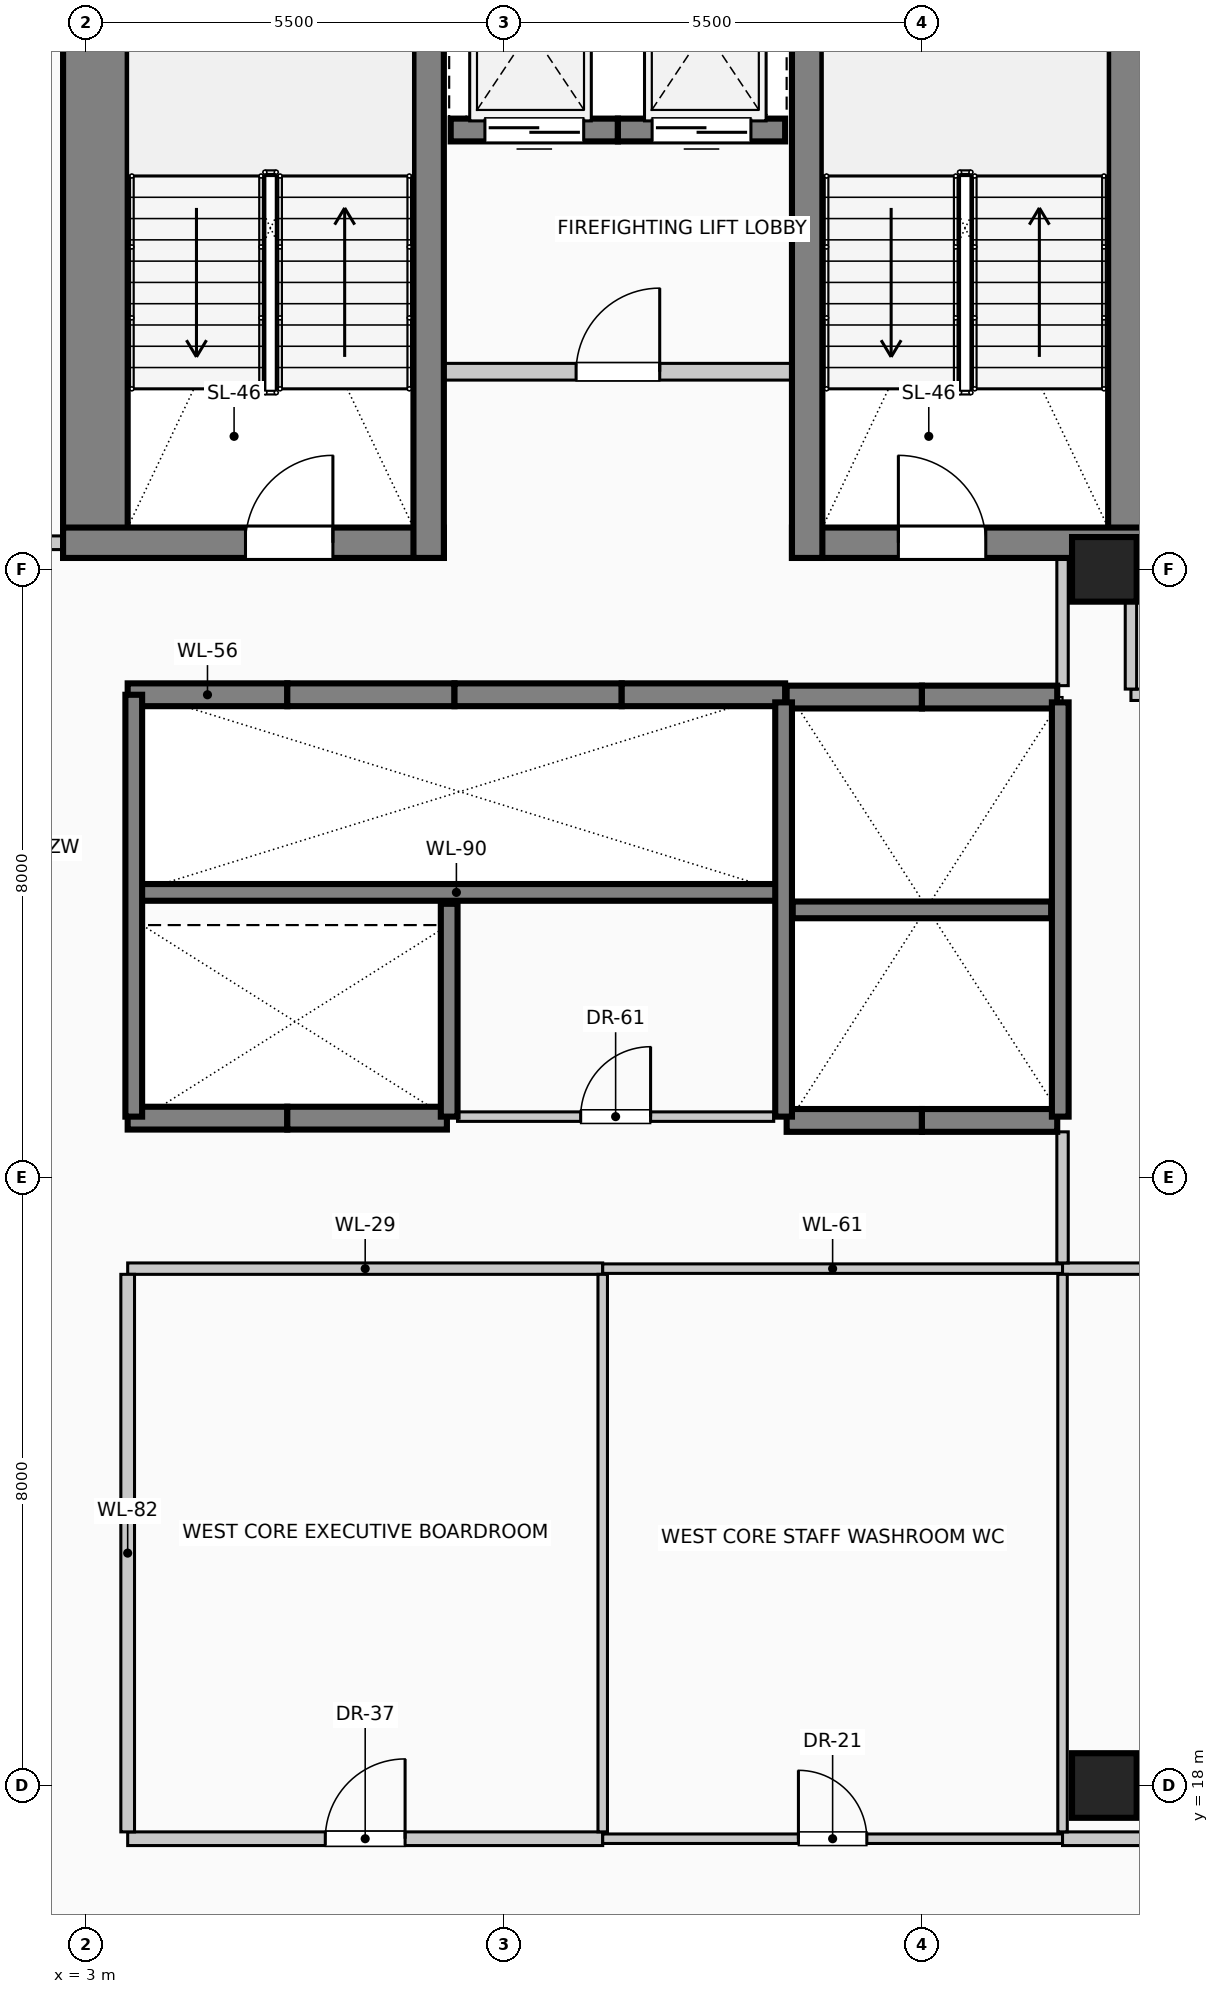
"""IFC4 building model, lengths in metres.
Left out: names, types, materials, properties, quantities, classifications, styles, units other than length and angle.
Written with IfcOpenShell. Run it as: python <this file> out.ifc"""

import sys

from ifc_helpers import new_model, si_unit, direction, frame, frame_2d, origin, origin_2d, place, context, subcontext, project, spatial, rectangle, circle, extrude, element, fill, save


model = new_model("IFC4")
c1 = context("Model", 3, precision=1e-05, world=origin(), true_north=direction((0.0, 1.0)))
c2 = subcontext(c1, "Body", "Model", "MODEL_VIEW")
j1 = project(units=[si_unit("LENGTHUNIT", "METRE"), si_unit("PLANEANGLEUNIT", "RADIAN")], contexts=[c1])
p1 = place(None, origin())
s1 = spatial("IfcSite", under=j1, at=p1, CompositionType="ELEMENT")
p2 = place(p1, origin())
s2 = spatial("IfcBuilding", under=s1, at=p2, CompositionType="ELEMENT")
p3 = place(p2, frame((0.0, 0.0, 170.6)))
s3 = spatial("IfcBuildingStorey", under=s2, at=p3, CompositionType="ELEMENT", Elevation=170.6)
for number, where, z_axis, x_axis in (
    (1, (3.125, 34.15, 0.0), (0.0, 0.0, 1.0), (0.0, 1.0, 0.0)),
    (2, (16.875, 34.15, 0.0), (0.0, 0.0, 1.0), (0.0, 1.0, 0.0)),
):
    element("IfcWall", number, at=place(p3, frame(where, z_axis=z_axis, x_axis=x_axis)), inside=s3, PredefinedType="SHEAR", context=c2, shape_type="SweptSolid", body=[
        extrude(rectangle(XDim=9.13, YDim=0.85, at=frame_2d((4.565, 0.0))), origin(), (0.0, 0.0, 1.0), 4.0),
    ])
p4 = place(p3, frame((2.7, 34.35, 0.0), z_axis=(0.0, 0.0, 1.0), x_axis=(1.0, 0.0, 0.0)))
e3 = element("IfcWall", 3, at=p4, inside=s3, PredefinedType="SHEAR", context=c2, shape_type="SweptSolid", body=[
    extrude(rectangle(XDim=5.01, YDim=0.4, at=frame_2d((2.505, 0.0))), origin(), (0.0, 0.0, 1.0), 4.0),
])
p5 = place(p4, frame((2.4, 0.0, 0.0)))
e4 = element("IfcOpeningElement", 4, at=p5, cuts=e3, PredefinedType="OPENING", context=c2, shape_type="SweptSolid", body=[
    extrude(rectangle(XDim=1.15, YDim=2.2, at=frame_2d((0.575, 1.1))), frame((0.0, 0.21, 0.0), z_axis=(0.0, -1.0, 0.0), x_axis=(1.0, 0.0, 0.0)), (0.0, 0.0, 1.0), 0.42),
])
p6 = place(p3, frame((12.29, 34.35, 0.0), z_axis=(0.0, 0.0, 1.0), x_axis=(1.0, 0.0, 0.0)))
e5 = element("IfcWall", 5, at=p6, inside=s3, PredefinedType="SHEAR", context=c2, shape_type="SweptSolid", body=[
    extrude(rectangle(XDim=5.01, YDim=0.4, at=frame_2d((2.505, 0.0))), origin(), (0.0, 0.0, 1.0), 4.0),
])
p7 = place(p6, frame((1.4, 0.0, 0.0)))
e6 = element("IfcOpeningElement", 6, at=p7, cuts=e5, PredefinedType="OPENING", context=c2, shape_type="SweptSolid", body=[
    extrude(rectangle(XDim=1.15, YDim=2.2, at=frame_2d((0.575, 1.1))), frame((0.0, 0.21, 0.0), z_axis=(0.0, -1.0, 0.0), x_axis=(1.0, 0.0, 0.0)), (0.0, 0.0, 1.0), 0.42),
])
for number, where, z_axis, x_axis in (
    (7, (7.51, 34.15, 0.0), (0.0, 0.0, 1.0), (0.0, 1.0, 0.0)),
    (8, (12.49, 34.15, 0.0), (0.0, 0.0, 1.0), (0.0, 1.0, 0.0)),
):
    element("IfcWall", number, at=place(p3, frame(where, z_axis=z_axis, x_axis=x_axis)), inside=s3, PredefinedType="SHEAR", context=c2, shape_type="SweptSolid", body=[
        extrude(rectangle(XDim=9.13, YDim=0.4, at=frame_2d((4.565, 0.0))), origin(), (0.0, 0.0, 1.0), 4.0),
    ])
for number, where, z_axis, x_axis in (
    (9, (16.4, 18.0, 0.0), (0.0, 0.0, 1.0), (1.0, 0.0, 0.0)),
    (10, (16.4, 34.0, 0.0), (0.0, 0.0, 1.0), (1.0, 0.0, 0.0)),
):
    element("IfcColumn", number, at=place(p3, frame(where, z_axis=z_axis, x_axis=x_axis)), inside=s3, PredefinedType="COLUMN", context=c2, shape_type="SweptSolid", body=[
        extrude(circle(Radius=0.425, at=origin_2d()), origin(), (0.0, 0.0, 1.0), 4.0),
    ])
for number, where, z_axis, x_axis in (
    (11, (14.0, 26.75, 0.0), (0.0, 0.0, 1.0), (-1.0, 0.0, 0.0)),
    (12, (15.78, 26.75, 0.0), (0.0, 0.0, 1.0), (-1.0, 0.0, 0.0)),
    (13, (12.22, 32.32, 0.0), (0.0, 0.0, 1.0), (1.0, 0.0, 0.0)),
    (14, (14.0, 32.32, 0.0), (0.0, 0.0, 1.0), (1.0, 0.0, 0.0)),
):
    element("IfcWall", number, at=place(p3, frame(where, z_axis=z_axis, x_axis=x_axis)), inside=s3, PredefinedType="SOLIDWALL", context=c2, shape_type="SweptSolid", body=[
        extrude(rectangle(XDim=1.78, YDim=0.3, at=frame_2d((0.89, 0.0))), origin(), (0.0, 0.0, 1.0), 4.0),
    ])
p8 = place(p3, frame((3.55, 32.35, 0.0), z_axis=(0.0, 0.0, 1.0), x_axis=(1.0, 0.0, 0.0)))
e15 = element("IfcWall", 15, at=p8, inside=s3, PredefinedType="SOLIDWALL", context=c2, shape_type="SweptSolid", body=[
    extrude(rectangle(XDim=2.1, YDim=0.3, at=frame_2d((1.05, 0.0))), origin(), (0.0, 0.0, 1.0), 4.0),
])
p9 = place(p3, frame((5.65, 32.35, 0.0), z_axis=(0.0, 0.0, 1.0), x_axis=(1.0, 0.0, 0.0)))
e16 = element("IfcWall", 16, at=p9, inside=s3, PredefinedType="SOLIDWALL", context=c2, shape_type="SweptSolid", body=[
    extrude(rectangle(XDim=2.2, YDim=0.3, at=frame_2d((1.1, 0.0))), origin(), (0.0, 0.0, 1.0), 4.0),
])
p10 = place(p3, frame((7.85, 32.35, 0.0), z_axis=(0.0, 0.0, 1.0), x_axis=(1.0, 0.0, 0.0)))
e17 = element("IfcWall", 17, at=p10, inside=s3, PredefinedType="SOLIDWALL", context=c2, shape_type="SweptSolid", body=[
    extrude(rectangle(XDim=2.2, YDim=0.3, at=frame_2d((1.1, 0.0))), origin(), (0.0, 0.0, 1.0), 4.0),
])
p11 = place(p3, frame((10.05, 32.35, 0.0), z_axis=(0.0, 0.0, 1.0), x_axis=(1.0, 0.0, 0.0)))
e18 = element("IfcWall", 18, at=p11, inside=s3, PredefinedType="SOLIDWALL", context=c2, shape_type="SweptSolid", body=[
    extrude(rectangle(XDim=2.15, YDim=0.3, at=frame_2d((1.075, 0.0))), origin(), (0.0, 0.0, 1.0), 4.0),
])
p12 = place(p3, frame((5.65, 26.78, 0.0), z_axis=(0.0, 0.0, 1.0), x_axis=(-1.0, 0.0, 0.0)))
e19 = element("IfcWall", 19, at=p12, inside=s3, PredefinedType="SOLIDWALL", context=c2, shape_type="SweptSolid", body=[
    extrude(rectangle(XDim=2.1, YDim=0.3, at=frame_2d((1.05, 0.0))), origin(), (0.0, 0.0, 1.0), 4.0),
])
p13 = place(p3, frame((7.75, 26.78, 0.0), z_axis=(0.0, 0.0, 1.0), x_axis=(-1.0, 0.0, 0.0)))
e20 = element("IfcWall", 20, at=p13, inside=s3, PredefinedType="SOLIDWALL", context=c2, shape_type="SweptSolid", body=[
    extrude(rectangle(XDim=2.1, YDim=0.3, at=frame_2d((1.05, 0.0))), origin(), (0.0, 0.0, 1.0), 4.0),
])
p14 = place(p3, frame((10.0, 39.78, 0.0), z_axis=(0.0, 0.0, 1.0), x_axis=(-1.0, 0.0, 0.0)))
e21 = element("IfcWall", 21, at=p14, inside=s3, PredefinedType="SOLIDWALL", context=c2, shape_type="SweptSolid", body=[
    extrude(rectangle(XDim=2.2, YDim=0.3, at=frame_2d((1.1, 0.0))), origin(), (0.0, 0.0, 1.0), 4.0),
])
p15 = place(p14, frame((0.45, 0.0, 0.0)))
e22 = element("IfcOpeningElement", 22, at=p15, cuts=e21, PredefinedType="OPENING", context=c2, shape_type="SweptSolid", body=[
    extrude(rectangle(XDim=1.3, YDim=2.25, at=frame_2d((0.65, 1.125))), frame((0.0, 0.16, 0.0), z_axis=(0.0, -1.0, 0.0), x_axis=(1.0, 0.0, 0.0)), (0.0, 0.0, 1.0), 0.32),
])
p16 = place(p3, frame((12.2, 39.78, 0.0), z_axis=(0.0, 0.0, 1.0), x_axis=(-1.0, 0.0, 0.0)))
e23 = element("IfcWall", 23, at=p16, inside=s3, PredefinedType="SOLIDWALL", context=c2, shape_type="SweptSolid", body=[
    extrude(rectangle(XDim=2.2, YDim=0.3, at=frame_2d((1.1, 0.0))), origin(), (0.0, 0.0, 1.0), 4.0),
])
p17 = place(p16, frame((0.45, 0.0, 0.0)))
e24 = element("IfcOpeningElement", 24, at=p17, cuts=e23, PredefinedType="OPENING", context=c2, shape_type="SweptSolid", body=[
    extrude(rectangle(XDim=1.3, YDim=2.25, at=frame_2d((0.65, 1.125))), frame((0.0, 0.16, 0.0), z_axis=(0.0, -1.0, 0.0), x_axis=(1.0, 0.0, 0.0)), (0.0, 0.0, 1.0), 0.32),
])
p18 = place(p3, frame((3.55, 29.75, 0.0), z_axis=(0.0, 0.0, 1.0), x_axis=(1.0, 0.0, 0.0)))
e25 = element("IfcWall", 25, at=p18, inside=s3, PredefinedType="SOLIDWALL", context=c2, shape_type="SweptSolid", body=[
    extrude(rectangle(XDim=8.65, YDim=0.22, at=frame_2d((4.325, 0.0))), origin(), (0.0, 0.0, 1.0), 4.0),
])
p19 = place(p3, frame((3.63, 26.8, 0.0), z_axis=(0.0, 0.0, 1.0), x_axis=(0.0, 1.0, 0.0)))
e26 = element("IfcWall", 26, at=p19, inside=s3, PredefinedType="SOLIDWALL", context=c2, shape_type="SweptSolid", body=[
    extrude(rectangle(XDim=5.55, YDim=0.22, at=frame_2d((2.775, 0.0))), origin(), (0.0, 0.0, 1.0), 4.0),
])
p20 = place(p3, frame((7.78, 26.8, 0.0), z_axis=(0.0, 0.0, 1.0), x_axis=(0.0, 1.0, 0.0)))
e27 = element("IfcWall", 27, at=p20, inside=s3, PredefinedType="SOLIDWALL", context=c2, shape_type="SweptSolid", body=[
    extrude(rectangle(XDim=2.8, YDim=0.22, at=frame_2d((1.4, 0.0))), origin(), (0.0, 0.0, 1.0), 4.0),
])
for number, where, z_axis, x_axis in (
    (28, (12.18, 26.8, 0.0), (0.0, 0.0, 1.0), (0.0, 1.0, 0.0)),
    (29, (15.82, 26.8, 0.0), (0.0, 0.0, 1.0), (0.0, 1.0, 0.0)),
):
    element("IfcWall", number, at=place(p3, frame(where, z_axis=z_axis, x_axis=x_axis)), inside=s3, PredefinedType="SOLIDWALL", context=c2, shape_type="SweptSolid", body=[
        extrude(rectangle(XDim=5.45, YDim=0.22, at=frame_2d((2.725, 0.0))), origin(), (0.0, 0.0, 1.0), 4.0),
    ])
p21 = place(p3, frame((12.3, 29.52, 0.0), z_axis=(0.0, 0.0, 1.0), x_axis=(1.0, 0.0, 0.0)))
e30 = element("IfcWall", 30, at=p21, inside=s3, PredefinedType="SOLIDWALL", context=c2, shape_type="SweptSolid", body=[
    extrude(rectangle(XDim=3.4, YDim=0.22, at=frame_2d((1.7, 0.0))), origin(), (0.0, 0.0, 1.0), 4.0),
])
p22 = place(p3, frame((7.51, 36.6, 0.0), z_axis=(0.0, 0.0, 1.0), x_axis=(1.0, 0.0, 0.0)))
e31 = element("IfcWall", 31, at=p22, inside=s3, PredefinedType="PARTITIONING", context=c2, shape_type="SweptSolid", body=[
    extrude(rectangle(XDim=4.98, YDim=0.22, at=frame_2d((2.49, 0.0))), origin(), (0.0, 0.0, 1.0), 3.725),
])
p23 = place(p22, frame((1.94, 0.0, 0.0)))
e32 = element("IfcOpeningElement", 32, at=p23, cuts=e31, PredefinedType="OPENING", context=c2, shape_type="SweptSolid", body=[
    extrude(rectangle(XDim=1.1, YDim=2.2, at=frame_2d((0.55, 1.1))), frame((0.0, 0.12, 0.0), z_axis=(0.0, -1.0, 0.0), x_axis=(1.0, 0.0, 0.0)), (0.0, 0.0, 1.0), 0.24),
])
p24 = place(p3, frame((3.55, 17.3, 0.0), z_axis=(0.0, 0.0, 1.0), x_axis=(1.0, 0.0, 0.0)))
e33 = element("IfcWall", 33, at=p24, inside=s3, PredefinedType="PARTITIONING", context=c2, shape_type="SweptSolid", body=[
    extrude(rectangle(XDim=6.25, YDim=0.18, at=frame_2d((3.125, 0.0))), origin(), (0.0, 0.0, 1.0), 3.725),
])
p25 = place(p24, frame((2.6, 0.0, 0.0)))
e34 = element("IfcOpeningElement", 34, at=p25, cuts=e33, PredefinedType="OPENING", context=c2, shape_type="SweptSolid", body=[
    extrude(rectangle(XDim=1.05, YDim=2.15, at=frame_2d((0.525, 1.075))), frame((0.0, 0.1, 0.0), z_axis=(0.0, -1.0, 0.0), x_axis=(1.0, 0.0, 0.0)), (0.0, 0.0, 1.0), 0.2),
])
p26 = place(p3, frame((9.8, 17.3, 0.0), z_axis=(0.0, 0.0, 1.0), x_axis=(1.0, 0.0, 0.0)))
e35 = element("IfcWall", 35, at=p26, inside=s3, PredefinedType="PARTITIONING", context=c2, shape_type="SweptSolid", body=[
    extrude(rectangle(XDim=6.05, YDim=0.125, at=frame_2d((3.025, 0.0))), origin(), (0.0, 0.0, 1.0), 3.725),
])
p27 = place(p26, frame((2.575, 0.0, 0.0)))
e36 = element("IfcOpeningElement", 36, at=p27, cuts=e35, PredefinedType="OPENING", context=c2, shape_type="SweptSolid", body=[
    extrude(rectangle(XDim=0.9, YDim=2.1, at=frame_2d((0.45, 1.05))), frame((0.0, 0.073, 0.0), z_axis=(0.0, -1.0, 0.0), x_axis=(1.0, 0.0, 0.0)), (0.0, 0.0, 1.0), 0.145),
])
p28 = place(p3, frame((15.85, 17.3, 0.0), z_axis=(0.0, 0.0, 1.0), x_axis=(1.0, 0.0, 0.0)))
e37 = element("IfcWall", 37, at=p28, inside=s3, PredefinedType="PARTITIONING", context=c2, shape_type="SweptSolid", body=[
    extrude(rectangle(XDim=5.15, YDim=0.18, at=frame_2d((2.575, 0.0))), origin(), (0.0, 0.0, 1.0), 3.725),
])
p29 = place(p28, frame((2.415, 0.0, 0.0)))
e38 = element("IfcOpeningElement", 38, at=p29, cuts=e37, PredefinedType="OPENING", context=c2, shape_type="SweptSolid", body=[
    extrude(rectangle(XDim=1.4, YDim=2.2, at=frame_2d((0.7, 1.1))), frame((0.0, 0.1, 0.0), z_axis=(0.0, -1.0, 0.0), x_axis=(1.0, 0.0, 0.0)), (0.0, 0.0, 1.0), 0.2),
])
p30 = place(p3, frame((3.55, 24.8, 0.0), z_axis=(0.0, 0.0, 1.0), x_axis=(1.0, 0.0, 0.0)))
e39 = element("IfcWall", 39, at=p30, inside=s3, PredefinedType="PARTITIONING", context=c2, shape_type="SweptSolid", body=[
    extrude(rectangle(XDim=6.25, YDim=0.15, at=frame_2d((3.125, 0.0))), origin(), (0.0, 0.0, 1.0), 3.725),
])
p31 = place(p3, frame((9.8, 24.8, 0.0), z_axis=(0.0, 0.0, 1.0), x_axis=(1.0, 0.0, 0.0)))
e40 = element("IfcWall", 40, at=p31, inside=s3, PredefinedType="PARTITIONING", context=c2, shape_type="SweptSolid", body=[
    extrude(rectangle(XDim=6.05, YDim=0.125, at=frame_2d((3.025, 0.0))), origin(), (0.0, 0.0, 1.0), 3.725),
])
p32 = place(p3, frame((15.85, 24.8, 0.0), z_axis=(0.0, 0.0, 1.0), x_axis=(1.0, 0.0, 0.0)))
e41 = element("IfcWall", 41, at=p32, inside=s3, PredefinedType="PARTITIONING", context=c2, shape_type="SweptSolid", body=[
    extrude(rectangle(XDim=5.15, YDim=0.15, at=frame_2d((2.575, 0.0))), origin(), (0.0, 0.0, 1.0), 3.725),
])
p33 = place(p3, frame((7.89, 26.8, 0.0), z_axis=(0.0, 0.0, 1.0), x_axis=(1.0, 0.0, 0.0)))
e42 = element("IfcWall", 42, at=p33, inside=s3, PredefinedType="PARTITIONING", context=c2, shape_type="SweptSolid", body=[
    extrude(rectangle(XDim=4.16, YDim=0.125, at=frame_2d((2.08, 0.0))), origin(), (0.0, 0.0, 1.0), 3.725),
])
p34 = place(p33, frame((1.62, 0.0, 0.0)))
e43 = element("IfcOpeningElement", 43, at=p34, cuts=e42, PredefinedType="OPENING", context=c2, shape_type="SweptSolid", body=[
    extrude(rectangle(XDim=0.92, YDim=2.1, at=frame_2d((0.46, 1.05))), frame((0.0, 0.073, 0.0), z_axis=(0.0, -1.0, 0.0), x_axis=(1.0, 0.0, 0.0)), (0.0, 0.0, 1.0), 0.145),
])
p35 = place(p3, frame((16.75, 32.35, 0.0), z_axis=(0.0, 0.0, 1.0), x_axis=(1.0, 0.0, 0.0)))
e44 = element("IfcWall", 44, at=p35, inside=s3, PredefinedType="PARTITIONING", context=c2, shape_type="SweptSolid", body=[
    extrude(rectangle(XDim=4.25, YDim=0.15, at=frame_2d((2.125, 0.0))), origin(), (0.0, 0.0, 1.0), 3.725),
])
p36 = place(p3, frame((1.15, 34.35, 0.0), z_axis=(0.0, 0.0, 1.0), x_axis=(1.0, 0.0, 0.0)))
e45 = element("IfcWall", 45, at=p36, inside=s3, PredefinedType="PARTITIONING", context=c2, shape_type="SweptSolid", body=[
    extrude(rectangle(XDim=1.55, YDim=0.18, at=frame_2d((0.775, 0.0))), origin(), (0.0, 0.0, 1.0), 3.725),
])
p37 = place(p3, frame((3.55, 17.39, 0.0), z_axis=(0.0, 0.0, 1.0), x_axis=(0.0, 1.0, 0.0)))
e46 = element("IfcWall", 46, at=p37, inside=s3, PredefinedType="PARTITIONING", context=c2, shape_type="SweptSolid", body=[
    extrude(rectangle(XDim=7.335, YDim=0.18, at=frame_2d((3.667, 0.0))), origin(), (0.0, 0.0, 1.0), 3.725),
])
for number, where, z_axis, x_axis in (
    (47, (9.8, 17.39, 0.0), (0.0, 0.0, 1.0), (0.0, 1.0, 0.0)),
    (48, (15.85, 17.39, 0.0), (0.0, 0.0, 1.0), (0.0, 1.0, 0.0)),
):
    element("IfcWall", number, at=place(p3, frame(where, z_axis=z_axis, x_axis=x_axis)), inside=s3, PredefinedType="PARTITIONING", context=c2, shape_type="SweptSolid", body=[
        extrude(rectangle(XDim=7.335, YDim=0.125, at=frame_2d((3.667, 0.0))), origin(), (0.0, 0.0, 1.0), 3.725),
    ])
p38 = place(p3, frame((15.85, 24.875, 0.0), z_axis=(0.0, 0.0, 1.0), x_axis=(0.0, 1.0, 0.0)))
e49 = element("IfcWall", 49, at=p38, inside=s3, PredefinedType="PARTITIONING", context=c2, shape_type="SweptSolid", body=[
    extrude(rectangle(XDim=1.725, YDim=0.15, at=frame_2d((0.863, 0.0))), origin(), (0.0, 0.0, 1.0), 3.725),
])
p39 = place(p3, frame((15.85, 32.47, 0.0), z_axis=(0.0, 0.0, 1.0), x_axis=(0.0, 1.0, 0.0)))
e50 = element("IfcWall", 50, at=p39, inside=s3, PredefinedType="PARTITIONING", context=c2, shape_type="SweptSolid", body=[
    extrude(rectangle(XDim=1.68, YDim=0.15, at=frame_2d((0.84, 0.0))), origin(), (0.0, 0.0, 1.0), 3.725),
])
p40 = place(p3, frame((16.75, 32.425, 0.0), z_axis=(0.0, 0.0, 1.0), x_axis=(0.0, 1.0, 0.0)))
e51 = element("IfcWall", 51, at=p40, inside=s3, PredefinedType="PARTITIONING", context=c2, shape_type="SweptSolid", body=[
    extrude(rectangle(XDim=1.15, YDim=0.15, at=frame_2d((0.575, 0.0))), origin(), (0.0, 0.0, 1.0), 3.725),
])
p41 = place(p15, origin())
e52 = element("IfcDoor", 52, at=p41, inside=s3, OperationType="SLIDING_TO_LEFT", PredefinedType="DOOR", context=c2, shape_type="SweptSolid", body=[
    extrude(rectangle(XDim=1.3, YDim=2.25, at=frame_2d((0.65, 1.125))), frame((0.0, 0.025, 0.0), z_axis=(0.0, -1.0, 0.0), x_axis=(1.0, 0.0, 0.0)), (0.0, 0.0, 1.0), 0.05),
])
fill(e22, e52)
p42 = place(p17, origin())
e53 = element("IfcDoor", 53, at=p42, inside=s3, OperationType="SLIDING_TO_RIGHT", PredefinedType="DOOR", context=c2, shape_type="SweptSolid", body=[
    extrude(rectangle(XDim=1.3, YDim=2.25, at=frame_2d((0.65, 1.125))), frame((0.0, 0.025, 0.0), z_axis=(0.0, -1.0, 0.0), x_axis=(1.0, 0.0, 0.0)), (0.0, 0.0, 1.0), 0.05),
])
fill(e24, e53)
p43 = place(p5, origin())
e54 = element("IfcDoor", 54, at=p43, inside=s3, OperationType="SINGLE_SWING_RIGHT", PredefinedType="DOOR", context=c2, shape_type="SweptSolid", body=[
    extrude(rectangle(XDim=1.15, YDim=2.2, at=frame_2d((0.575, 1.1))), frame((0.0, 0.025, 0.0), z_axis=(0.0, -1.0, 0.0), x_axis=(1.0, 0.0, 0.0)), (0.0, 0.0, 1.0), 0.05),
])
fill(e4, e54)
p44 = place(p7, origin())
e55 = element("IfcDoor", 55, at=p44, inside=s3, OperationType="SINGLE_SWING_LEFT", PredefinedType="DOOR", context=c2, shape_type="SweptSolid", body=[
    extrude(rectangle(XDim=1.15, YDim=2.2, at=frame_2d((0.575, 1.1))), frame((0.0, 0.025, 0.0), z_axis=(0.0, -1.0, 0.0), x_axis=(1.0, 0.0, 0.0)), (0.0, 0.0, 1.0), 0.05),
])
fill(e6, e55)
p45 = place(p23, origin())
e56 = element("IfcDoor", 56, at=p45, inside=s3, OperationType="SINGLE_SWING_RIGHT", PredefinedType="DOOR", context=c2, shape_type="SweptSolid", body=[
    extrude(rectangle(XDim=1.1, YDim=2.2, at=frame_2d((0.55, 1.1))), frame((0.0, 0.025, 0.0), z_axis=(0.0, -1.0, 0.0), x_axis=(1.0, 0.0, 0.0)), (0.0, 0.0, 1.0), 0.05),
])
fill(e32, e56)
p46 = place(p25, origin())
e57 = element("IfcDoor", 57, at=p46, inside=s3, OperationType="SINGLE_SWING_RIGHT", PredefinedType="DOOR", context=c2, shape_type="SweptSolid", body=[
    extrude(rectangle(XDim=1.05, YDim=2.15, at=frame_2d((0.525, 1.075))), frame((0.0, 0.025, 0.0), z_axis=(0.0, -1.0, 0.0), x_axis=(1.0, 0.0, 0.0)), (0.0, 0.0, 1.0), 0.05),
])
fill(e34, e57)
p47 = place(p27, origin())
e58 = element("IfcDoor", 58, at=p47, inside=s3, OperationType="SINGLE_SWING_LEFT", PredefinedType="DOOR", context=c2, shape_type="SweptSolid", body=[
    extrude(rectangle(XDim=0.9, YDim=2.1, at=frame_2d((0.45, 1.05))), frame((0.0, 0.025, 0.0), z_axis=(0.0, -1.0, 0.0), x_axis=(1.0, 0.0, 0.0)), (0.0, 0.0, 1.0), 0.05),
])
fill(e36, e58)
p48 = place(p34, origin())
e59 = element("IfcDoor", 59, at=p48, inside=s3, OperationType="SINGLE_SWING_RIGHT", PredefinedType="DOOR", context=c2, shape_type="SweptSolid", body=[
    extrude(rectangle(XDim=0.92, YDim=2.1, at=frame_2d((0.46, 1.05))), frame((0.0, 0.025, 0.0), z_axis=(0.0, -1.0, 0.0), x_axis=(1.0, 0.0, 0.0)), (0.0, 0.0, 1.0), 0.05),
])
fill(e43, e59)
save(model, sys.argv[1])
